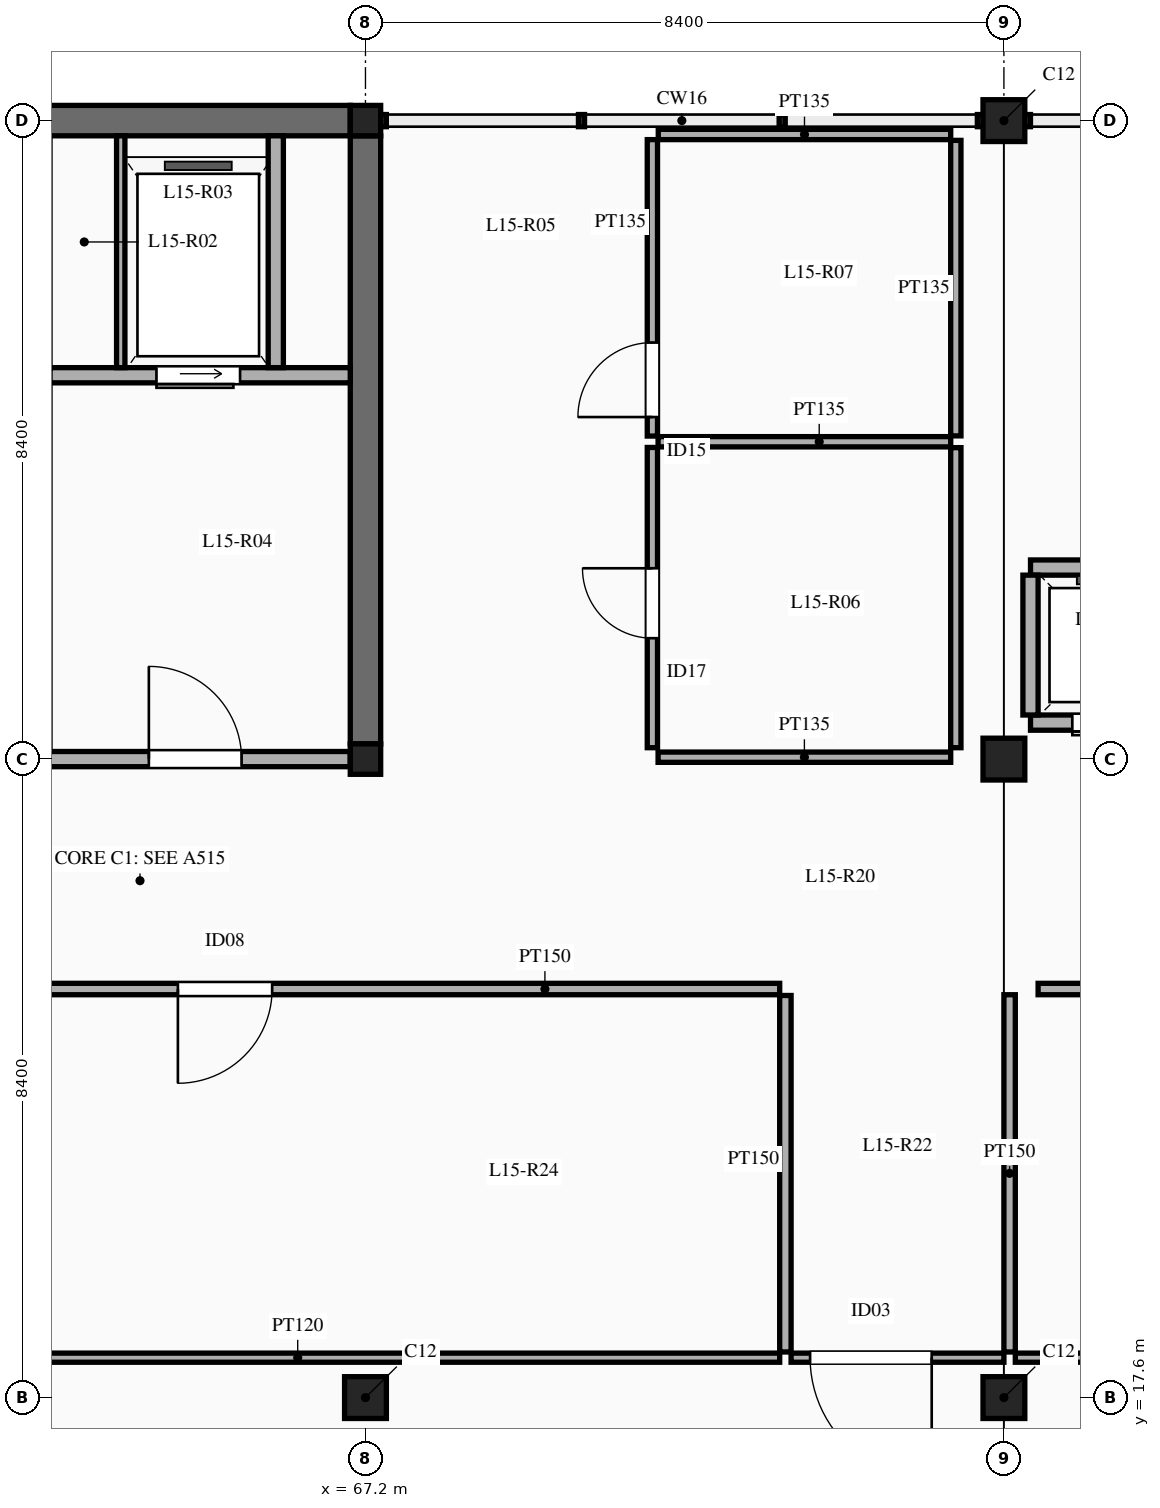
"""IFC4 building model, lengths in metres.
Left out: names, types, materials, properties, quantities, classifications, styles, units other than length and angle.
Written with IfcOpenShell. Run it as: python <this file> out.ifc"""

import sys

from ifc_helpers import new_model, si_unit, direction, frame, frame_2d, origin, origin_2d, place, context, subcontext, project, spatial, rectangle, extrude, element, fill, save


model = new_model("IFC4")
c1 = context("Model", 3, precision=1e-05, world=origin(), true_north=direction((0.0, 1.0)))
c2 = subcontext(c1, "Body", "Model", "MODEL_VIEW")
j1 = project(units=[si_unit("LENGTHUNIT", "METRE"), si_unit("PLANEANGLEUNIT", "RADIAN")], contexts=[c1])
p1 = place(None, origin())
s1 = spatial("IfcSite", under=j1, at=p1, CompositionType="ELEMENT")
p2 = place(p1, origin())
s2 = spatial("IfcBuilding", under=s1, at=p2, CompositionType="ELEMENT")
p3 = place(p2, frame((0.0, 0.0, 69.0)))
s3 = spatial("IfcBuildingStorey", under=s2, at=p3, CompositionType="ELEMENT", Elevation=69.0)
p4 = place(p3, frame((67.2, 17.6, 0.0), z_axis=(0.0, 0.0, 1.0), x_axis=(1.0, 0.0, 0.0)))
e1 = element("IfcColumn", 1, at=p4, inside=s3, PredefinedType="COLUMN", context=c2, shape_type="SweptSolid", body=[
    extrude(rectangle(XDim=0.55, YDim=0.55, at=origin_2d()), origin(), (0.0, 0.0, 1.0), 4.5),
])
for number, where, z_axis, x_axis in (
    (2, (67.2, 26.0, 0.0), (0.0, 0.0, 1.0), (1.0, 0.0, 0.0)),
    (3, (67.2, 34.4, 0.0), (0.0, 0.0, 1.0), (1.0, 0.0, 0.0)),
):
    element("IfcColumn", number, at=place(p3, frame(where, z_axis=z_axis, x_axis=x_axis)), inside=s3, PredefinedType="COLUMN", context=c2, shape_type="SweptSolid", body=[
        extrude(rectangle(XDim=0.4, YDim=0.4, at=origin_2d()), origin(), (0.0, 0.0, 1.0), 4.5),
    ])
for number, where, z_axis, x_axis in (
    (4, (75.6, 17.6, 0.0), (0.0, 0.0, 1.0), (1.0, 0.0, 0.0)),
    (5, (75.6, 26.0, 0.0), (0.0, 0.0, 1.0), (1.0, 0.0, 0.0)),
    (6, (75.6, 34.4, 0.0), (0.0, 0.0, 1.0), (1.0, 0.0, 0.0)),
):
    element("IfcColumn", number, at=place(p3, frame(where, z_axis=z_axis, x_axis=x_axis)), inside=s3, PredefinedType="COLUMN", context=c2, shape_type="SweptSolid", body=[
        extrude(rectangle(XDim=0.55, YDim=0.55, at=origin_2d()), origin(), (0.0, 0.0, 1.0), 4.5),
    ])
for number, where, z_axis, x_axis in (
    (7, (67.2, 26.2, 0.0), (0.0, 0.0, 1.0), (0.0, 1.0, 0.0)),
    (8, (59.0, 34.4, 0.0), (0.0, 0.0, 1.0), (1.0, 0.0, 0.0)),
):
    element("IfcWall", number, at=place(p3, frame(where, z_axis=z_axis, x_axis=x_axis)), inside=s3, PredefinedType="SHEAR", context=c2, shape_type="SweptSolid", body=[
        extrude(rectangle(XDim=8.0, YDim=0.4, at=frame_2d((4.0, 0.0))), origin(), (0.0, 0.0, 1.0), 4.5),
    ])
p5 = place(p3, frame((59.0, 26.0, 0.0), z_axis=(0.0, 0.0, 1.0), x_axis=(1.0, 0.0, 0.0)))
e9 = element("IfcWall", 9, at=p5, inside=s3, PredefinedType="SOLIDWALL", context=c2, shape_type="SweptSolid", body=[
    extrude(rectangle(XDim=8.0, YDim=0.2, at=frame_2d((4.0, 0.0))), origin(), (0.0, 0.0, 1.0), 3.88),
])
p6 = place(p5, frame((1.55, 0.0, 0.0)))
e10 = element("IfcOpeningElement", 10, at=p6, cuts=e9, PredefinedType="OPENING", context=c2, shape_type="SweptSolid", body=[
    extrude(rectangle(XDim=1.15, YDim=2.15, at=frame_2d((0.575, 1.075))), frame((0.0, 0.11, 0.0), z_axis=(0.0, -1.0, 0.0), x_axis=(1.0, 0.0, 0.0)), (0.0, 0.0, 1.0), 0.22),
])
p7 = place(p5, frame((5.35, 0.0, 0.0)))
e11 = element("IfcOpeningElement", 11, at=p7, cuts=e9, PredefinedType="OPENING", context=c2, shape_type="SweptSolid", body=[
    extrude(rectangle(XDim=1.22, YDim=2.15, at=frame_2d((0.61, 1.075))), frame((0.0, 0.11, 0.0), z_axis=(0.0, -1.0, 0.0), x_axis=(1.0, 0.0, 0.0)), (0.0, 0.0, 1.0), 0.22),
])
p8 = place(p3, frame((63.05, 31.05, 0.0), z_axis=(0.0, 0.0, 1.0), x_axis=(1.0, 0.0, 0.0)))
e12 = element("IfcWall", 12, at=p8, inside=s3, PredefinedType="SOLIDWALL", context=c2, shape_type="SweptSolid", body=[
    extrude(rectangle(XDim=3.95, YDim=0.2, at=frame_2d((1.975, 0.0))), origin(), (0.0, 0.0, 1.0), 4.3),
])
p9 = place(p8, frame((1.4, 0.0, 0.0)))
e13 = element("IfcOpeningElement", 13, at=p9, cuts=e12, PredefinedType="OPENING", context=c2, shape_type="SweptSolid", body=[
    extrude(rectangle(XDim=1.1, YDim=2.15, at=frame_2d((0.55, 1.075))), frame((0.0, 0.11, 0.0), z_axis=(0.0, -1.0, 0.0), x_axis=(1.0, 0.0, 0.0)), (0.0, 0.0, 1.0), 0.22),
])
p10 = place(p3, frame((63.98, 31.15, 0.0), z_axis=(0.0, 0.0, 1.0), x_axis=(0.0, 1.0, 0.0)))
e14 = element("IfcWall", 14, at=p10, inside=s3, PredefinedType="PARTITIONING", context=c2, shape_type="SweptSolid", body=[
    extrude(rectangle(XDim=3.05, YDim=0.11, at=frame_2d((1.525, 0.0))), origin(), (0.0, 0.0, 1.0), 4.3),
])
p11 = place(p3, frame((66.02, 31.15, 0.0), z_axis=(0.0, 0.0, 1.0), x_axis=(0.0, 1.0, 0.0)))
e15 = element("IfcWall", 15, at=p11, inside=s3, PredefinedType="SOLIDWALL", context=c2, shape_type="SweptSolid", body=[
    extrude(rectangle(XDim=3.05, YDim=0.2, at=frame_2d((1.525, 0.0))), origin(), (0.0, 0.0, 1.0), 4.3),
])
p12 = place(p3, frame((75.95, 26.48, 0.0), z_axis=(0.0, 0.0, 1.0), x_axis=(1.0, 0.0, 0.0)))
e16 = element("IfcWall", 16, at=p12, inside=s3, PredefinedType="SOLIDWALL", context=c2, shape_type="SweptSolid", body=[
    extrude(rectangle(XDim=7.77, YDim=0.2, at=frame_2d((3.885, 0.0))), origin(), (0.0, 0.0, 1.0), 4.3),
])
p13 = place(p12, frame((0.55, 0.0, 0.0)))
e17 = element("IfcOpeningElement", 17, at=p13, cuts=e16, PredefinedType="OPENING", context=c2, shape_type="SweptSolid", body=[
    extrude(rectangle(XDim=1.0, YDim=2.15, at=frame_2d((0.5, 1.075))), frame((0.0, 0.11, 0.0), z_axis=(0.0, -1.0, 0.0), x_axis=(1.0, 0.0, 0.0)), (0.0, 0.0, 1.0), 0.22),
])
p14 = place(p12, frame((3.35, 0.0, 0.0)))
e18 = element("IfcOpeningElement", 18, at=p14, cuts=e16, PredefinedType="OPENING", context=c2, shape_type="SweptSolid", body=[
    extrude(rectangle(XDim=1.0, YDim=2.15, at=frame_2d((0.5, 1.075))), frame((0.0, 0.11, 0.0), z_axis=(0.0, -1.0, 0.0), x_axis=(1.0, 0.0, 0.0)), (0.0, 0.0, 1.0), 0.22),
])
p15 = place(p12, frame((6.15, 0.0, 0.0)))
e19 = element("IfcOpeningElement", 19, at=p15, cuts=e16, PredefinedType="OPENING", context=c2, shape_type="SweptSolid", body=[
    extrude(rectangle(XDim=1.0, YDim=2.15, at=frame_2d((0.5, 1.075))), frame((0.0, 0.11, 0.0), z_axis=(0.0, -1.0, 0.0), x_axis=(1.0, 0.0, 0.0)), (0.0, 0.0, 1.0), 0.22),
])
p16 = place(p3, frame((75.95, 28.52, 0.0), z_axis=(0.0, 0.0, 1.0), x_axis=(1.0, 0.0, 0.0)))
e20 = element("IfcWall", 20, at=p16, inside=s3, PredefinedType="SOLIDWALL", context=c2, shape_type="SweptSolid", body=[
    extrude(rectangle(XDim=7.77, YDim=0.2, at=frame_2d((3.885, 0.0))), origin(), (0.0, 0.0, 1.0), 4.3),
])
p17 = place(p3, frame((75.95, 26.58, 0.0), z_axis=(0.0, 0.0, 1.0), x_axis=(0.0, 1.0, 0.0)))
e21 = element("IfcWall", 21, at=p17, inside=s3, PredefinedType="SOLIDWALL", context=c2, shape_type="SweptSolid", body=[
    extrude(rectangle(XDim=1.84, YDim=0.2, at=frame_2d((0.92, 0.0))), origin(), (0.0, 0.0, 1.0), 4.3),
])
p18 = place(p3, frame((70.975, 26.15, 0.0), z_axis=(0.0, 0.0, 1.0), x_axis=(0.0, 1.0, 0.0)))
e22 = element("IfcWall", 22, at=p18, inside=s3, PredefinedType="PARTITIONING", context=c2, shape_type="SweptSolid", body=[
    extrude(rectangle(XDim=3.95, YDim=0.135, at=frame_2d((1.975, 0.0))), origin(), (0.0, 0.0, 1.0), 3.45),
])
p19 = place(p18, frame((1.441, 0.0, 0.0)))
e23 = element("IfcOpeningElement", 23, at=p19, cuts=e22, PredefinedType="OPENING", context=c2, shape_type="SweptSolid", body=[
    extrude(rectangle(XDim=0.92, YDim=2.12, at=frame_2d((0.46, 1.06))), frame((0.0, 0.077, 0.0), z_axis=(0.0, -1.0, 0.0), x_axis=(1.0, 0.0, 0.0)), (0.0, 0.0, 1.0), 0.155),
])
p20 = place(p3, frame((70.975, 30.25, 0.0), z_axis=(0.0, 0.0, 1.0), x_axis=(0.0, 1.0, 0.0)))
e24 = element("IfcWall", 24, at=p20, inside=s3, PredefinedType="PARTITIONING", context=c2, shape_type="SweptSolid", body=[
    extrude(rectangle(XDim=3.9, YDim=0.135, at=frame_2d((1.95, 0.0))), origin(), (0.0, 0.0, 1.0), 3.45),
])
p21 = place(p20, frame((0.25, 0.0, 0.0)))
e25 = element("IfcOpeningElement", 25, at=p21, cuts=e24, PredefinedType="OPENING", context=c2, shape_type="SweptSolid", body=[
    extrude(rectangle(XDim=0.98, YDim=2.15, at=frame_2d((0.49, 1.075))), frame((0.0, 0.077, 0.0), z_axis=(0.0, -1.0, 0.0), x_axis=(1.0, 0.0, 0.0)), (0.0, 0.0, 1.0), 0.155),
])
for number, where, z_axis, x_axis in (
    (26, (71.05, 30.175, 0.0), (0.0, 0.0, 1.0), (1.0, 0.0, 0.0)),
    (27, (71.05, 26.025, 0.0), (0.0, 0.0, 1.0), (1.0, 0.0, 0.0)),
):
    element("IfcWall", number, at=place(p3, frame(where, z_axis=z_axis, x_axis=x_axis)), inside=s3, PredefinedType="PARTITIONING", context=c2, shape_type="SweptSolid", body=[
        extrude(rectangle(XDim=3.85, YDim=0.135, at=frame_2d((1.925, 0.0))), origin(), (0.0, 0.0, 1.0), 3.45),
    ])
p22 = place(p3, frame((76.05, 22.975, 0.0), z_axis=(0.0, 0.0, 1.0), x_axis=(1.0, 0.0, 0.0)))
e28 = element("IfcWall", 28, at=p22, inside=s3, PredefinedType="PARTITIONING", context=c2, shape_type="SweptSolid", body=[
    extrude(rectangle(XDim=8.45, YDim=0.15, at=frame_2d((4.225, 0.0))), origin(), (0.0, 0.0, 1.0), 3.45),
])
p23 = place(p22, frame((3.531, 0.0, 0.0)))
e29 = element("IfcOpeningElement", 29, at=p23, cuts=e28, PredefinedType="OPENING", context=c2, shape_type="SweptSolid", body=[
    extrude(rectangle(XDim=1.24, YDim=2.2, at=frame_2d((0.62, 1.1))), frame((0.0, 0.085, 0.0), z_axis=(0.0, -1.0, 0.0), x_axis=(1.0, 0.0, 0.0)), (0.0, 0.0, 1.0), 0.17),
])
p24 = place(p3, frame((59.25, 22.975, 0.0), z_axis=(0.0, 0.0, 1.0), x_axis=(1.0, 0.0, 0.0)))
e30 = element("IfcWall", 30, at=p24, inside=s3, PredefinedType="PARTITIONING", context=c2, shape_type="SweptSolid", body=[
    extrude(rectangle(XDim=13.4, YDim=0.15, at=frame_2d((6.7, 0.0))), origin(), (0.0, 0.0, 1.0), 3.45),
])
p25 = place(p24, frame((5.482, 0.0, 0.0)))
e31 = element("IfcOpeningElement", 31, at=p25, cuts=e30, PredefinedType="OPENING", context=c2, shape_type="SweptSolid", body=[
    extrude(rectangle(XDim=1.24, YDim=2.2, at=frame_2d((0.62, 1.1))), frame((0.0, 0.085, 0.0), z_axis=(0.0, -1.0, 0.0), x_axis=(1.0, 0.0, 0.0)), (0.0, 0.0, 1.0), 0.17),
])
p26 = place(p3, frame((72.8, 18.125, 0.0), z_axis=(0.0, 0.0, 1.0), x_axis=(1.0, 0.0, 0.0)))
e32 = element("IfcWall", 32, at=p26, inside=s3, PredefinedType="PARTITIONING", context=c2, shape_type="SweptSolid", body=[
    extrude(rectangle(XDim=2.8, YDim=0.12, at=frame_2d((1.4, 0.0))), origin(), (0.0, 0.0, 1.0), 3.45),
])
p27 = place(p26, frame((0.25, 0.0, 0.0)))
e33 = element("IfcOpeningElement", 33, at=p27, cuts=e32, PredefinedType="OPENING", context=c2, shape_type="SweptSolid", body=[
    extrude(rectangle(XDim=1.6, YDim=2.35, at=frame_2d((0.8, 1.175))), frame((0.0, 0.07, 0.0), z_axis=(0.0, -1.0, 0.0), x_axis=(1.0, 0.0, 0.0)), (0.0, 0.0, 1.0), 0.14),
])
p28 = place(p3, frame((72.725, 18.2, 0.0), z_axis=(0.0, 0.0, 1.0), x_axis=(0.0, 1.0, 0.0)))
e34 = element("IfcWall", 34, at=p28, inside=s3, PredefinedType="PARTITIONING", context=c2, shape_type="SweptSolid", body=[
    extrude(rectangle(XDim=4.69, YDim=0.15, at=frame_2d((2.345, 0.0))), origin(), (0.0, 0.0, 1.0), 3.45),
])
p29 = place(p3, frame((75.675, 18.2, 0.0), z_axis=(0.0, 0.0, 1.0), x_axis=(0.0, 1.0, 0.0)))
e35 = element("IfcWall", 35, at=p29, inside=s3, PredefinedType="PARTITIONING", context=c2, shape_type="SweptSolid", body=[
    extrude(rectangle(XDim=4.7, YDim=0.15, at=frame_2d((2.35, 0.0))), origin(), (0.0, 0.0, 1.0), 3.45),
])
p30 = place(p3, frame((59.25, 18.125, 0.0), z_axis=(0.0, 0.0, 1.0), x_axis=(1.0, 0.0, 0.0)))
e36 = element("IfcWall", 36, at=p30, inside=s3, PredefinedType="PARTITIONING", context=c2, shape_type="SweptSolid", body=[
    extrude(rectangle(XDim=13.4, YDim=0.12, at=frame_2d((6.7, 0.0))), origin(), (0.0, 0.0, 1.0), 3.45),
])
p31 = place(p3, frame((75.75, 18.125, 0.0), z_axis=(0.0, 0.0, 1.0), x_axis=(1.0, 0.0, 0.0)))
e37 = element("IfcWall", 37, at=p31, inside=s3, PredefinedType="PARTITIONING", context=c2, shape_type="SweptSolid", body=[
    extrude(rectangle(XDim=11.85, YDim=0.12, at=frame_2d((5.925, 0.0))), origin(), (0.0, 0.0, 1.0), 3.45),
])
p32 = place(p3, frame((74.968, 26.15, 0.0), z_axis=(0.0, 0.0, 1.0), x_axis=(0.0, 1.0, 0.0)))
e38 = element("IfcWall", 38, at=p32, inside=s3, PredefinedType="PARTITIONING", context=c2, shape_type="SweptSolid", body=[
    extrude(rectangle(XDim=3.948, YDim=0.135, at=frame_2d((1.974, 0.0))), origin(), (0.0, 0.0, 1.0), 3.45),
])
p33 = place(p3, frame((71.052, 34.218, 0.0), z_axis=(0.0, 0.0, 1.0), x_axis=(1.0, 0.0, 0.0)))
e39 = element("IfcWall", 39, at=p33, inside=s3, PredefinedType="PARTITIONING", context=c2, shape_type="SweptSolid", body=[
    extrude(rectangle(XDim=3.847, YDim=0.135, at=frame_2d((1.924, 0.0))), origin(), (0.0, 0.0, 1.0), 3.45),
])
p34 = place(p3, frame((74.968, 30.252, 0.0), z_axis=(0.0, 0.0, 1.0), x_axis=(0.0, 1.0, 0.0)))
e40 = element("IfcWall", 40, at=p34, inside=s3, PredefinedType="PARTITIONING", context=c2, shape_type="SweptSolid", body=[
    extrude(rectangle(XDim=3.887, YDim=0.135, at=frame_2d((1.944, 0.0))), origin(), (0.0, 0.0, 1.0), 3.45),
])
p35 = place(p7, origin())
e41 = element("IfcDoor", 41, at=p35, inside=s3, OperationType="SINGLE_SWING_LEFT", PredefinedType="DOOR", context=c2, shape_type="SweptSolid", body=[
    extrude(rectangle(XDim=1.22, YDim=2.15, at=frame_2d((0.61, 1.075))), frame((0.0, 0.025, 0.0), z_axis=(0.0, -1.0, 0.0), x_axis=(1.0, 0.0, 0.0)), (0.0, 0.0, 1.0), 0.05),
])
fill(e11, e41)
p36 = place(p9, frame((1.1, 0.0, 0.0), z_axis=(0.0, 0.0, 1.0), x_axis=(-1.0, 0.0, 0.0)))
e42 = element("IfcDoor", 42, at=p36, inside=s3, OperationType="SLIDING_TO_LEFT", PredefinedType="DOOR", context=c2, shape_type="SweptSolid", body=[
    extrude(rectangle(XDim=1.1, YDim=2.15, at=frame_2d((0.55, 1.075))), frame((0.0, 0.025, 0.0), z_axis=(0.0, -1.0, 0.0), x_axis=(1.0, 0.0, 0.0)), (0.0, 0.0, 1.0), 0.05),
])
fill(e13, e42)
p37 = place(p13, frame((1.0, 0.0, 0.0), z_axis=(0.0, 0.0, 1.0), x_axis=(-1.0, 0.0, 0.0)))
e43 = element("IfcDoor", 43, at=p37, inside=s3, OperationType="SLIDING_TO_LEFT", PredefinedType="DOOR", context=c2, shape_type="SweptSolid", body=[
    extrude(rectangle(XDim=1.0, YDim=2.15, at=frame_2d((0.5, 1.075))), frame((0.0, 0.025, 0.0), z_axis=(0.0, -1.0, 0.0), x_axis=(1.0, 0.0, 0.0)), (0.0, 0.0, 1.0), 0.05),
])
fill(e17, e43)
p38 = place(p19, origin())
e44 = element("IfcDoor", 44, at=p38, inside=s3, OperationType="SINGLE_SWING_RIGHT", PredefinedType="DOOR", context=c2, shape_type="SweptSolid", body=[
    extrude(rectangle(XDim=0.92, YDim=2.12, at=frame_2d((0.46, 1.06))), frame((0.0, 0.025, 0.0), z_axis=(0.0, -1.0, 0.0), x_axis=(1.0, 0.0, 0.0)), (0.0, 0.0, 1.0), 0.05),
])
fill(e23, e44)
p39 = place(p21, origin())
e45 = element("IfcDoor", 45, at=p39, inside=s3, OperationType="SINGLE_SWING_LEFT", PredefinedType="DOOR", context=c2, shape_type="SweptSolid", body=[
    extrude(rectangle(XDim=0.98, YDim=2.15, at=frame_2d((0.49, 1.075))), frame((0.0, 0.025, 0.0), z_axis=(0.0, -1.0, 0.0), x_axis=(1.0, 0.0, 0.0)), (0.0, 0.0, 1.0), 0.05),
])
fill(e25, e45)
p40 = place(p27, frame((1.6, 0.0, 0.0), z_axis=(0.0, 0.0, 1.0), x_axis=(-1.0, 0.0, 0.0)))
e46 = element("IfcDoor", 46, at=p40, inside=s3, OperationType="SINGLE_SWING_LEFT", PredefinedType="DOOR", context=c2, shape_type="SweptSolid", body=[
    extrude(rectangle(XDim=1.6, YDim=2.35, at=frame_2d((0.8, 1.175))), frame((0.0, 0.025, 0.0), z_axis=(0.0, -1.0, 0.0), x_axis=(1.0, 0.0, 0.0)), (0.0, 0.0, 1.0), 0.05),
])
fill(e33, e46)
p41 = place(p25, frame((1.24, 0.0, 0.0), z_axis=(0.0, 0.0, 1.0), x_axis=(-1.0, 0.0, 0.0)))
e47 = element("IfcDoor", 47, at=p41, inside=s3, OperationType="SINGLE_SWING_RIGHT", PredefinedType="DOOR", context=c2, shape_type="SweptSolid", body=[
    extrude(rectangle(XDim=1.24, YDim=2.2, at=frame_2d((0.62, 1.1))), frame((0.0, 0.025, 0.0), z_axis=(0.0, -1.0, 0.0), x_axis=(1.0, 0.0, 0.0)), (0.0, 0.0, 1.0), 0.05),
])
fill(e31, e47)
save(model, sys.argv[1])
